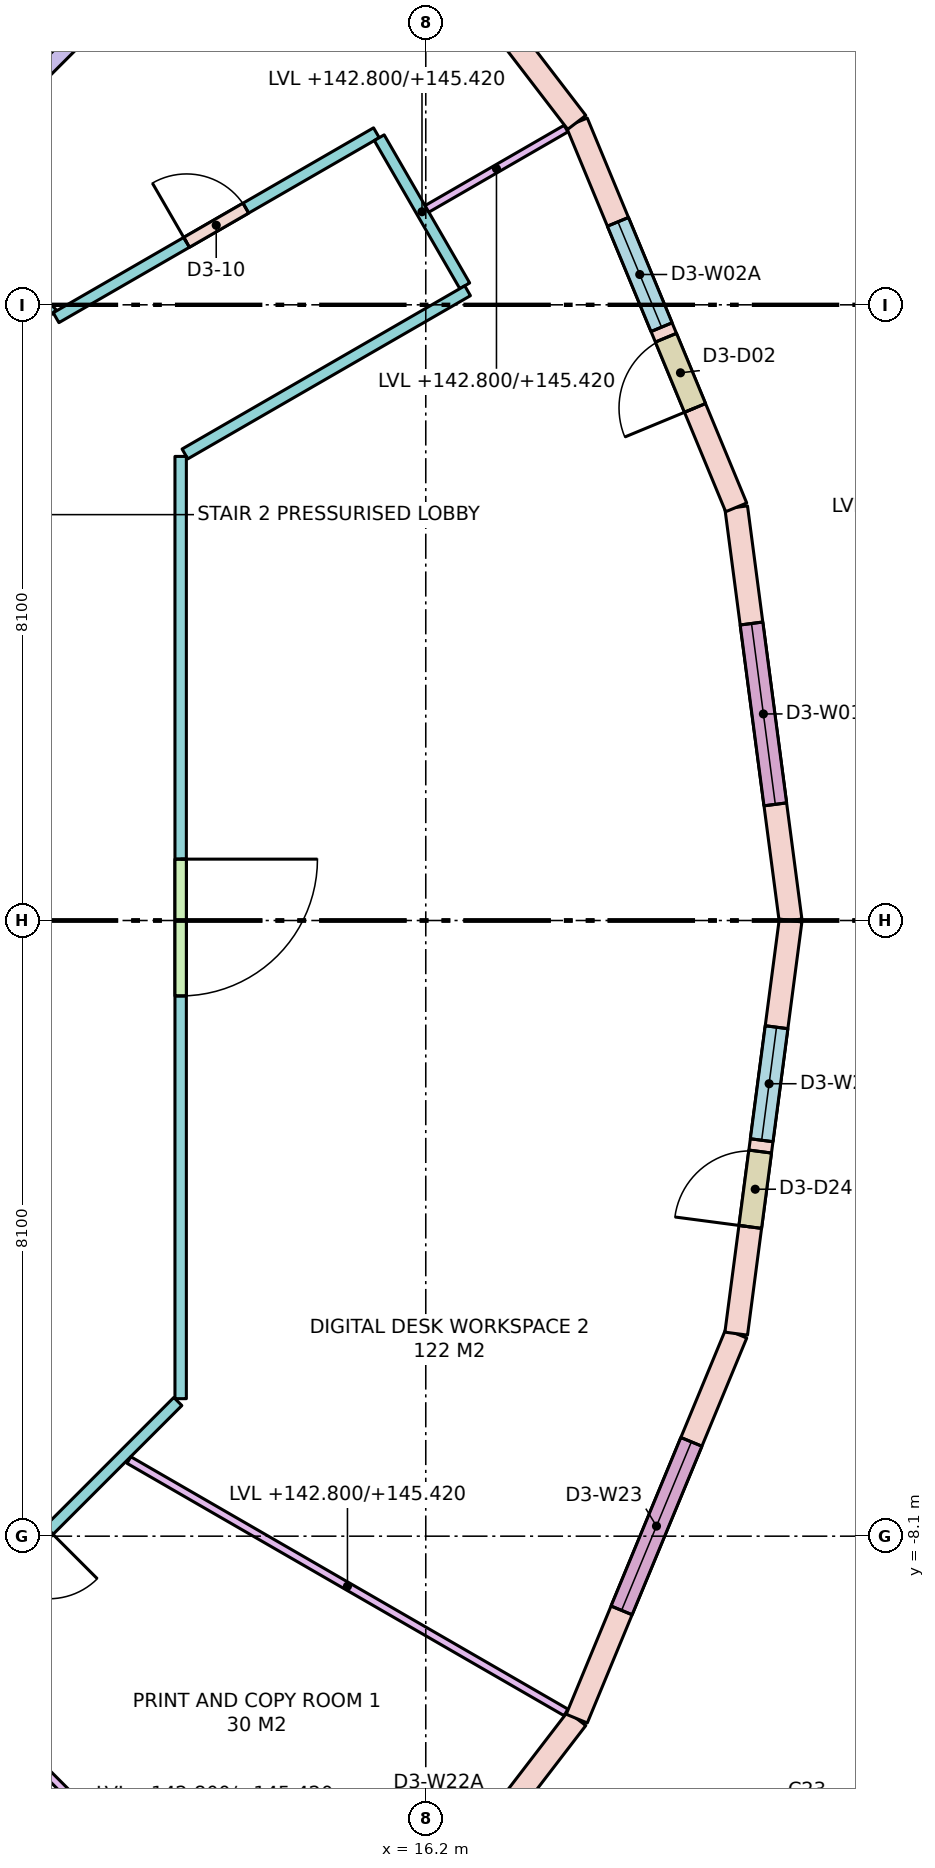
"""IFC4 building model, lengths in metres.
Left out: names, types, materials, properties, quantities, classifications, styles, units other than length and angle.
Written with IfcOpenShell. Run it as: python <this file> out.ifc"""

import sys

from ifc_helpers import new_model, si_unit, direction, frame, frame_2d, origin, place, context, subcontext, project, spatial, rectangle, extrude, element, fill, save


model = new_model("IFC4")
c1 = context("Model", 3, precision=1e-05, world=origin(), true_north=direction((0.0, 1.0)))
c2 = subcontext(c1, "Body", "Model", "MODEL_VIEW")
j1 = project(units=[si_unit("LENGTHUNIT", "METRE"), si_unit("PLANEANGLEUNIT", "RADIAN")], contexts=[c1])
p1 = place(None, origin())
s1 = spatial("IfcSite", under=j1, at=p1, CompositionType="ELEMENT")
p2 = place(p1, origin())
s2 = spatial("IfcBuilding", under=s1, at=p2, CompositionType="ELEMENT")
p3 = place(p2, frame((0.0, 0.0, 142.8)))
s3 = spatial("IfcBuildingStorey", under=s2, at=p3, CompositionType="ELEMENT", Elevation=142.8)
p4 = place(p3, frame((21.0, 0.0, 0.0), z_axis=(0.0, 0.0, 1.0), x_axis=(-0.130527087244, 0.991444743541, 0.0)))
e1 = element("IfcWall", 1, at=p4, inside=s3, PredefinedType="STANDARD", context=c2, shape_type="SweptSolid", body=[
    extrude(rectangle(XDim=5.482, YDim=0.3, at=frame_2d((2.741, 0.0))), origin(), (0.0, 0.0, 1.0), 3.52),
])
p5 = place(p4, frame((1.541, 0.0, 0.8)))
e2 = element("IfcOpeningElement", 2, at=p5, cuts=e1, PredefinedType="OPENING", context=c2, shape_type="SweptSolid", body=[
    extrude(rectangle(XDim=2.4, YDim=2.5, at=frame_2d((1.2, 1.25))), frame((0.0, 0.16, 0.0), z_axis=(0.0, -1.0, 0.0), x_axis=(1.0, 0.0, 0.0)), (0.0, 0.0, 1.0), 0.32),
])
p6 = place(p3, frame((20.284, 5.435, 0.0), z_axis=(0.0, 0.0, 1.0), x_axis=(-0.382688740813, 0.923877333662, 0.0)))
e3 = element("IfcWall", 3, at=p6, inside=s3, PredefinedType="STANDARD", context=c2, shape_type="SweptSolid", body=[
    extrude(rectangle(XDim=5.482, YDim=0.3, at=frame_2d((2.741, 0.0))), origin(), (0.0, 0.0, 1.0), 3.52),
])
p7 = place(p6, frame((1.416, 0.0, 0.0)))
e4 = element("IfcOpeningElement", 4, at=p7, cuts=e3, PredefinedType="OPENING", context=c2, shape_type="SweptSolid", body=[
    extrude(rectangle(XDim=1.0, YDim=2.4, at=frame_2d((0.5, 1.2))), frame((0.0, 0.16, 0.0), z_axis=(0.0, -1.0, 0.0), x_axis=(1.0, 0.0, 0.0)), (0.0, 0.0, 1.0), 0.32),
])
p8 = place(p6, frame((2.566, 0.0, 0.8)))
e5 = element("IfcOpeningElement", 5, at=p8, cuts=e3, PredefinedType="OPENING", context=c2, shape_type="SweptSolid", body=[
    extrude(rectangle(XDim=1.5, YDim=2.5, at=frame_2d((0.75, 1.25))), frame((0.0, 0.16, 0.0), z_axis=(0.0, -1.0, 0.0), x_axis=(1.0, 0.0, 0.0)), (0.0, 0.0, 1.0), 0.32),
])
p9 = place(p3, frame((18.187, 10.5, 0.0), z_axis=(0.0, 0.0, 1.0), x_axis=(-0.608784891166, 0.793335336593, 0.0)))
e6 = element("IfcWall", 6, at=p9, inside=s3, PredefinedType="STANDARD", context=c2, shape_type="SweptSolid", body=[
    extrude(rectangle(XDim=5.482, YDim=0.3, at=frame_2d((2.741, 0.0))), origin(), (0.0, 0.0, 1.0), 3.52),
])
p10 = place(p9, frame((1.541, 0.0, 0.8)))
e7 = element("IfcOpeningElement", 7, at=p10, cuts=e6, PredefinedType="OPENING", context=c2, shape_type="SweptSolid", body=[
    extrude(rectangle(XDim=2.4, YDim=2.5, at=frame_2d((1.2, 1.25))), frame((0.0, 0.16, 0.0), z_axis=(0.0, -1.0, 0.0), x_axis=(1.0, 0.0, 0.0)), (0.0, 0.0, 1.0), 0.32),
])
p11 = place(p3, frame((14.849, -14.849, 0.0), z_axis=(0.0, 0.0, 1.0), x_axis=(0.608784891166, 0.793335336593, 0.0)))
e8 = element("IfcWall", 8, at=p11, inside=s3, PredefinedType="STANDARD", context=c2, shape_type="SweptSolid", body=[
    extrude(rectangle(XDim=5.482, YDim=0.3, at=frame_2d((2.741, 0.0))), origin(), (0.0, 0.0, 1.0), 3.52),
])
p12 = place(p11, frame((1.416, 0.0, 0.0)))
e9 = element("IfcOpeningElement", 9, at=p12, cuts=e8, PredefinedType="OPENING", context=c2, shape_type="SweptSolid", body=[
    extrude(rectangle(XDim=1.0, YDim=2.4, at=frame_2d((0.5, 1.2))), frame((0.0, 0.16, 0.0), z_axis=(0.0, -1.0, 0.0), x_axis=(1.0, 0.0, 0.0)), (0.0, 0.0, 1.0), 0.32),
])
p13 = place(p11, frame((2.566, 0.0, 0.8)))
e10 = element("IfcOpeningElement", 10, at=p13, cuts=e8, PredefinedType="OPENING", context=c2, shape_type="SweptSolid", body=[
    extrude(rectangle(XDim=1.5, YDim=2.5, at=frame_2d((0.75, 1.25))), frame((0.0, 0.16, 0.0), z_axis=(0.0, -1.0, 0.0), x_axis=(1.0, 0.0, 0.0)), (0.0, 0.0, 1.0), 0.32),
])
p14 = place(p3, frame((18.187, -10.5, 0.0), z_axis=(0.0, 0.0, 1.0), x_axis=(0.382688740813, 0.923877333662, 0.0)))
e11 = element("IfcWall", 11, at=p14, inside=s3, PredefinedType="STANDARD", context=c2, shape_type="SweptSolid", body=[
    extrude(rectangle(XDim=5.482, YDim=0.3, at=frame_2d((2.741, 0.0))), origin(), (0.0, 0.0, 1.0), 3.52),
])
p15 = place(p14, frame((1.541, 0.0, 0.8)))
e12 = element("IfcOpeningElement", 12, at=p15, cuts=e11, PredefinedType="OPENING", context=c2, shape_type="SweptSolid", body=[
    extrude(rectangle(XDim=2.4, YDim=2.5, at=frame_2d((1.2, 1.25))), frame((0.0, 0.16, 0.0), z_axis=(0.0, -1.0, 0.0), x_axis=(1.0, 0.0, 0.0)), (0.0, 0.0, 1.0), 0.32),
])
p16 = place(p3, frame((20.284, -5.435, 0.0), z_axis=(0.0, 0.0, 1.0), x_axis=(0.130527087244, 0.991444743541, 0.0)))
e13 = element("IfcWall", 13, at=p16, inside=s3, PredefinedType="STANDARD", context=c2, shape_type="SweptSolid", body=[
    extrude(rectangle(XDim=5.482, YDim=0.3, at=frame_2d((2.741, 0.0))), origin(), (0.0, 0.0, 1.0), 3.52),
])
p17 = place(p16, frame((1.416, 0.0, 0.0)))
e14 = element("IfcOpeningElement", 14, at=p17, cuts=e13, PredefinedType="OPENING", context=c2, shape_type="SweptSolid", body=[
    extrude(rectangle(XDim=1.0, YDim=2.4, at=frame_2d((0.5, 1.2))), frame((0.0, 0.16, 0.0), z_axis=(0.0, -1.0, 0.0), x_axis=(1.0, 0.0, 0.0)), (0.0, 0.0, 1.0), 0.32),
])
p18 = place(p16, frame((2.566, 0.0, 0.8)))
e15 = element("IfcOpeningElement", 15, at=p18, cuts=e13, PredefinedType="OPENING", context=c2, shape_type="SweptSolid", body=[
    extrude(rectangle(XDim=1.5, YDim=2.5, at=frame_2d((0.75, 1.25))), frame((0.0, 0.16, 0.0), z_axis=(0.0, -1.0, 0.0), x_axis=(1.0, 0.0, 0.0)), (0.0, 0.0, 1.0), 0.32),
])
p19 = place(p3, frame((9.633, 9.633, 0.0), z_axis=(0.0, 0.0, 1.0), x_axis=(0.707106781187, -0.707106781187, 0.0)))
e16 = element("IfcWall", 16, at=p19, inside=s3, PredefinedType="PARTITIONING", context=c2, shape_type="SweptSolid", body=[
    extrude(rectangle(XDim=2.335, YDim=0.15, at=frame_2d((1.168, 0.0))), origin(), (0.0, 0.0, 1.0), 2.62),
])
p20 = place(p3, frame((11.336, 7.93, 0.0), z_axis=(0.0, 0.0, 1.0), x_axis=(0.866042731792, 0.49996998581, 0.0)))
e17 = element("IfcWall", 17, at=p20, inside=s3, PredefinedType="PARTITIONING", context=c2, shape_type="SweptSolid", body=[
    extrude(rectangle(XDim=4.866, YDim=0.15, at=frame_2d((2.433, 0.0))), origin(), (0.0, 0.0, 1.0), 3.52),
])
p21 = place(p20, frame((1.983, 0.0, 0.0)))
e18 = element("IfcOpeningElement", 18, at=p21, cuts=e17, PredefinedType="OPENING", context=c2, shape_type="SweptSolid", body=[
    extrude(rectangle(XDim=0.9, YDim=2.1, at=frame_2d((0.45, 1.05))), frame((0.0, 0.085, 0.0), z_axis=(0.0, -1.0, 0.0), x_axis=(1.0, 0.0, 0.0)), (0.0, 0.0, 1.0), 0.17),
])
p22 = place(p3, frame((15.588, 10.299, 0.0), z_axis=(0.0, 0.0, 1.0), x_axis=(0.500013631625, -0.866017533419, 0.0)))
e19 = element("IfcWall", 19, at=p22, inside=s3, PredefinedType="PARTITIONING", context=c2, shape_type="SweptSolid", body=[
    extrude(rectangle(XDim=2.25, YDim=0.15, at=frame_2d((1.125, 0.0))), origin(), (0.0, 0.0, 1.0), 2.62),
])
p23 = place(p3, frame((16.75, 8.285, 0.0), z_axis=(0.0, 0.0, 1.0), x_axis=(-0.866019905438, -0.500009523294, 0.0)))
e20 = element("IfcWall", 20, at=p23, inside=s3, PredefinedType="PARTITIONING", context=c2, shape_type="SweptSolid", body=[
    extrude(rectangle(XDim=4.294, YDim=0.15, at=frame_2d((2.147, 0.0))), origin(), (0.0, 0.0, 1.0), 3.52),
])
p24 = place(p3, frame((12.975, 6.105, 0.0), z_axis=(0.0, 0.0, 1.0), x_axis=(0.0, -1.0, 0.0)))
e21 = element("IfcWall", 21, at=p24, inside=s3, PredefinedType="PARTITIONING", context=c2, shape_type="SweptSolid", body=[
    extrude(rectangle(XDim=12.396, YDim=0.15, at=frame_2d((6.198, 0.0))), origin(), (0.0, 0.0, 1.0), 2.62),
])
p25 = place(p24, frame((5.298, 0.0, 0.0)))
e22 = element("IfcOpeningElement", 22, at=p25, cuts=e21, PredefinedType="OPENING", context=c2, shape_type="SweptSolid", body=[
    extrude(rectangle(XDim=1.8, YDim=2.1, at=frame_2d((0.9, 1.05))), frame((0.0, 0.085, 0.0), z_axis=(0.0, -1.0, 0.0), x_axis=(1.0, 0.0, 0.0)), (0.0, 0.0, 1.0), 0.17),
])
p26 = place(p3, frame((12.938, -6.328, 0.0), z_axis=(0.0, 0.0, 1.0), x_axis=(-0.707088206597, -0.707125355289, 0.0)))
e23 = element("IfcWall", 23, at=p26, inside=s3, PredefinedType="PARTITIONING", context=c2, shape_type="SweptSolid", body=[
    extrude(rectangle(XDim=6.572, YDim=0.15, at=frame_2d((3.286, 0.0))), origin(), (0.0, 0.0, 1.0), 2.62),
])
p27 = place(p26, frame((2.398, 0.0, 0.0)))
e24 = element("IfcOpeningElement", 24, at=p27, cuts=e23, PredefinedType="OPENING", context=c2, shape_type="SweptSolid", body=[
    extrude(rectangle(XDim=0.9, YDim=2.1, at=frame_2d((0.45, 1.05))), frame((0.0, 0.085, 0.0), z_axis=(0.0, -1.0, 0.0), x_axis=(1.0, 0.0, 0.0)), (0.0, 0.0, 1.0), 0.17),
])
p28 = place(p3, frame((16.215, 9.362, 0.0), z_axis=(0.0, 0.0, 1.0), x_axis=(0.866016279763, 0.500015802937, 0.0)))
e25 = element("IfcWall", 25, at=p28, inside=s3, PredefinedType="PARTITIONING", context=c2, shape_type="SweptSolid", body=[
    extrude(rectangle(XDim=2.113, YDim=0.1, at=frame_2d((1.057, 0.0))), origin(), (0.0, 0.0, 1.0), 2.62),
])
p29 = place(p3, frame((9.704, 9.704, 0.0), z_axis=(0.0, 0.0, 1.0), x_axis=(0.707106781187, 0.707106781187, 0.0)))
e26 = element("IfcWall", 26, at=p29, inside=s3, PredefinedType="PARTITIONING", context=c2, shape_type="SweptSolid", body=[
    extrude(rectangle(XDim=7.114, YDim=0.2, at=frame_2d((3.557, 0.0))), origin(), (0.0, 0.0, 1.0), 2.62),
])
p30 = place(p3, frame((9.686, -9.686, 0.0), z_axis=(0.0, 0.0, 1.0), x_axis=(0.707106781187, -0.707106781187, 0.0)))
e27 = element("IfcWall", 27, at=p30, inside=s3, PredefinedType="PARTITIONING", context=c2, shape_type="SweptSolid", body=[
    extrude(rectangle(XDim=7.139, YDim=0.1, at=frame_2d((3.569, 0.0))), origin(), (0.0, 0.0, 1.0), 2.62),
])
p31 = place(p3, frame((12.294, -7.098, 0.0), z_axis=(0.0, 0.0, 1.0), x_axis=(0.866010486135, -0.500025837236, 0.0)))
e28 = element("IfcWall", 28, at=p31, inside=s3, PredefinedType="PARTITIONING", context=c2, shape_type="SweptSolid", body=[
    extrude(rectangle(XDim=6.641, YDim=0.1, at=frame_2d((3.32, 0.0))), origin(), (0.0, 0.0, 1.0), 2.62),
])
p32 = place(p5, origin())
e29 = element("IfcWindow", 29, at=p32, inside=s3, PartitioningType="SINGLE_PANEL", PredefinedType="WINDOW", context=c2, shape_type="SweptSolid", body=[
    extrude(rectangle(XDim=2.4, YDim=2.5, at=frame_2d((1.2, 1.25))), frame((0.0, 0.03, 0.0), z_axis=(0.0, -1.0, 0.0), x_axis=(1.0, 0.0, 0.0)), (0.0, 0.0, 1.0), 0.06),
])
fill(e2, e29)
p33 = place(p7, origin())
e30 = element("IfcDoor", 30, at=p33, inside=s3, OperationType="SINGLE_SWING_LEFT", PredefinedType="DOOR", context=c2, shape_type="SweptSolid", body=[
    extrude(rectangle(XDim=1.0, YDim=2.4, at=frame_2d((0.5, 1.2))), frame((0.0, 0.025, 0.0), z_axis=(0.0, -1.0, 0.0), x_axis=(1.0, 0.0, 0.0)), (0.0, 0.0, 1.0), 0.05),
])
fill(e4, e30)
p34 = place(p8, origin())
e31 = element("IfcWindow", 31, at=p34, inside=s3, PartitioningType="SINGLE_PANEL", PredefinedType="WINDOW", context=c2, shape_type="SweptSolid", body=[
    extrude(rectangle(XDim=1.5, YDim=2.5, at=frame_2d((0.75, 1.25))), frame((0.0, 0.03, 0.0), z_axis=(0.0, -1.0, 0.0), x_axis=(1.0, 0.0, 0.0)), (0.0, 0.0, 1.0), 0.06),
])
fill(e5, e31)
p35 = place(p15, origin())
e32 = element("IfcWindow", 32, at=p35, inside=s3, PartitioningType="SINGLE_PANEL", PredefinedType="WINDOW", context=c2, shape_type="SweptSolid", body=[
    extrude(rectangle(XDim=2.4, YDim=2.5, at=frame_2d((1.2, 1.25))), frame((0.0, 0.03, 0.0), z_axis=(0.0, -1.0, 0.0), x_axis=(1.0, 0.0, 0.0)), (0.0, 0.0, 1.0), 0.06),
])
fill(e12, e32)
p36 = place(p17, origin())
e33 = element("IfcDoor", 33, at=p36, inside=s3, OperationType="SINGLE_SWING_LEFT", PredefinedType="DOOR", context=c2, shape_type="SweptSolid", body=[
    extrude(rectangle(XDim=1.0, YDim=2.4, at=frame_2d((0.5, 1.2))), frame((0.0, 0.025, 0.0), z_axis=(0.0, -1.0, 0.0), x_axis=(1.0, 0.0, 0.0)), (0.0, 0.0, 1.0), 0.05),
])
fill(e14, e33)
p37 = place(p18, origin())
e34 = element("IfcWindow", 34, at=p37, inside=s3, PartitioningType="SINGLE_PANEL", PredefinedType="WINDOW", context=c2, shape_type="SweptSolid", body=[
    extrude(rectangle(XDim=1.5, YDim=2.5, at=frame_2d((0.75, 1.25))), frame((0.0, 0.03, 0.0), z_axis=(0.0, -1.0, 0.0), x_axis=(1.0, 0.0, 0.0)), (0.0, 0.0, 1.0), 0.06),
])
fill(e15, e34)
p38 = place(p25, origin())
e35 = element("IfcDoor", 35, at=p38, inside=s3, OperationType="DOUBLE_DOOR_SINGLE_SWING", PredefinedType="DOOR", context=c2, shape_type="SweptSolid", body=[
    extrude(rectangle(XDim=1.8, YDim=2.1, at=frame_2d((0.9, 1.05))), frame((0.0, 0.025, 0.0), z_axis=(0.0, -1.0, 0.0), x_axis=(1.0, 0.0, 0.0)), (0.0, 0.0, 1.0), 0.05),
])
fill(e22, e35)
p39 = place(p21, origin())
e36 = element("IfcDoor", 36, at=p39, inside=s3, OperationType="SINGLE_SWING_LEFT", PredefinedType="DOOR", context=c2, shape_type="SweptSolid", body=[
    extrude(rectangle(XDim=0.9, YDim=2.1, at=frame_2d((0.45, 1.05))), frame((0.0, 0.025, 0.0), z_axis=(0.0, -1.0, 0.0), x_axis=(1.0, 0.0, 0.0)), (0.0, 0.0, 1.0), 0.05),
])
fill(e18, e36)
save(model, sys.argv[1])
